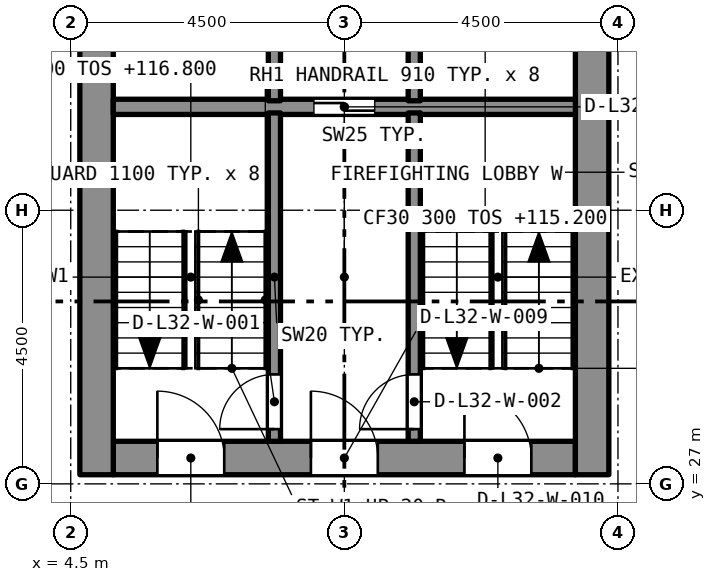
"""IFC4 building model, lengths in metres.
Left out: names, types, materials, properties, quantities, classifications, styles, units other than length and angle.
Written with IfcOpenShell. Run it as: python <this file> out.ifc"""

import sys

from ifc_helpers import new_model, si_unit, direction, frame, frame_2d, origin, place, context, subcontext, project, spatial, rectangle, extrude, element, fill, save


model = new_model("IFC4")
c1 = context("Model", 3, precision=1e-05, world=origin(), true_north=direction((0.0, 1.0)))
c2 = subcontext(c1, "Body", "Model", "MODEL_VIEW")
j1 = project(units=[si_unit("LENGTHUNIT", "METRE"), si_unit("PLANEANGLEUNIT", "RADIAN")], contexts=[c1])
p1 = place(None, origin())
s1 = spatial("IfcSite", under=j1, at=p1, CompositionType="ELEMENT")
p2 = place(p1, origin())
s2 = spatial("IfcBuilding", under=s1, at=p2, CompositionType="ELEMENT")
p3 = place(p2, frame((0.0, 0.0, 115.2)))
s3 = spatial("IfcBuildingStorey", under=s2, at=p3, CompositionType="ELEMENT", Elevation=115.2)
p4 = place(p3, frame((5.2, 27.425, 0.0), z_axis=(0.0, 0.0, 1.0), x_axis=(1.0, 0.0, 0.0)))
e1 = element("IfcWall", 1, at=p4, inside=s3, PredefinedType="SOLIDWALL", context=c2, shape_type="SweptSolid", body=[
    extrude(rectangle(XDim=7.6, YDim=0.55, at=frame_2d((3.8, 0.0))), origin(), (0.0, 0.0, 1.0), 3.2),
])
p5 = place(p4, frame((0.725, 0.0, 0.0)))
e2 = element("IfcOpeningElement", 2, at=p5, cuts=e1, PredefinedType="OPENING", context=c2, shape_type="SweptSolid", body=[
    extrude(rectangle(XDim=1.1, YDim=2.1, at=frame_2d((0.55, 1.05))), frame((0.0, 0.285, 0.0), z_axis=(0.0, -1.0, 0.0), x_axis=(1.0, 0.0, 0.0)), (0.0, 0.0, 1.0), 0.57),
])
p6 = place(p4, frame((3.25, 0.0, 0.0)))
e3 = element("IfcOpeningElement", 3, at=p6, cuts=e1, PredefinedType="OPENING", context=c2, shape_type="SweptSolid", body=[
    extrude(rectangle(XDim=1.1, YDim=2.1, at=frame_2d((0.55, 1.05))), frame((0.0, 0.285, 0.0), z_axis=(0.0, -1.0, 0.0), x_axis=(1.0, 0.0, 0.0)), (0.0, 0.0, 1.0), 0.57),
])
p7 = place(p4, frame((5.775, 0.0, 0.0)))
e4 = element("IfcOpeningElement", 4, at=p7, cuts=e1, PredefinedType="OPENING", context=c2, shape_type="SweptSolid", body=[
    extrude(rectangle(XDim=1.1, YDim=2.1, at=frame_2d((0.55, 1.05))), frame((0.0, 0.285, 0.0), z_axis=(0.0, -1.0, 0.0), x_axis=(1.0, 0.0, 0.0)), (0.0, 0.0, 1.0), 0.57),
])
p8 = place(p3, frame((4.925, 27.15, 0.0), z_axis=(0.0, 0.0, 1.0), x_axis=(0.0, 1.0, 0.0)))
e5 = element("IfcWall", 5, at=p8, inside=s3, PredefinedType="SOLIDWALL", context=c2, shape_type="SweptSolid", body=[
    extrude(rectangle(XDim=13.2, YDim=0.55, at=frame_2d((6.6, 0.0))), origin(), (0.0, 0.0, 1.0), 3.2),
])
p9 = place(p8, frame((8.8, 0.0, 0.0)))
e6 = element("IfcOpeningElement", 6, at=p9, cuts=e5, PredefinedType="OPENING", context=c2, shape_type="SweptSolid", body=[
    extrude(rectangle(XDim=1.2, YDim=2.1, at=frame_2d((0.6, 1.05))), frame((0.0, 0.285, 0.0), z_axis=(0.0, -1.0, 0.0), x_axis=(1.0, 0.0, 0.0)), (0.0, 0.0, 1.0), 0.57),
])
p10 = place(p3, frame((13.075, 27.15, 0.0), z_axis=(0.0, 0.0, 1.0), x_axis=(0.0, 1.0, 0.0)))
e7 = element("IfcWall", 7, at=p10, inside=s3, PredefinedType="SOLIDWALL", context=c2, shape_type="SweptSolid", body=[
    extrude(rectangle(XDim=13.2, YDim=0.55, at=frame_2d((6.6, 0.0))), origin(), (0.0, 0.0, 1.0), 3.2),
])
p11 = place(p10, frame((10.95, 0.0, 0.0)))
e8 = element("IfcOpeningElement", 8, at=p11, cuts=e7, PredefinedType="OPENING", context=c2, shape_type="SweptSolid", body=[
    extrude(rectangle(XDim=1.1, YDim=2.1, at=frame_2d((0.55, 1.05))), frame((0.0, 0.285, 0.0), z_axis=(0.0, -1.0, 0.0), x_axis=(1.0, 0.0, 0.0)), (0.0, 0.0, 1.0), 0.57),
])
p12 = place(p10, frame((8.8, 0.0, 0.0)))
e9 = element("IfcOpeningElement", 9, at=p12, cuts=e7, PredefinedType="OPENING", context=c2, shape_type="SweptSolid", body=[
    extrude(rectangle(XDim=1.2, YDim=2.1, at=frame_2d((0.6, 1.05))), frame((0.0, 0.285, 0.0), z_axis=(0.0, -1.0, 0.0), x_axis=(1.0, 0.0, 0.0)), (0.0, 0.0, 1.0), 0.57),
])
p13 = place(p3, frame((5.2, 33.2, 0.0), z_axis=(0.0, 0.0, 1.0), x_axis=(1.0, 0.0, 0.0)))
e10 = element("IfcWall", 10, at=p13, inside=s3, PredefinedType="SOLIDWALL", context=c2, shape_type="SweptSolid", body=[
    extrude(rectangle(XDim=7.6, YDim=0.25, at=frame_2d((3.8, 0.0))), origin(), (0.0, 0.0, 1.0), 2.9),
])
p14 = place(p13, frame((3.3, 0.0, 0.0)))
e11 = element("IfcOpeningElement", 11, at=p14, cuts=e10, PredefinedType="OPENING", context=c2, shape_type="SweptSolid", body=[
    extrude(rectangle(XDim=1.0, YDim=2.1, at=frame_2d((0.5, 1.05))), frame((0.0, 0.135, 0.0), z_axis=(0.0, -1.0, 0.0), x_axis=(1.0, 0.0, 0.0)), (0.0, 0.0, 1.0), 0.27),
])
p15 = place(p3, frame((7.85, 27.7, 0.0), z_axis=(0.0, 0.0, 1.0), x_axis=(0.0, 1.0, 0.0)))
e12 = element("IfcWall", 12, at=p15, inside=s3, PredefinedType="SOLIDWALL", context=c2, shape_type="SweptSolid", body=[
    extrude(rectangle(XDim=5.4, YDim=0.2, at=frame_2d((2.7, 0.0))), origin(), (0.0, 0.0, 1.0), 2.9),
])
p16 = place(p15, frame((0.2, 0.0, 0.0)))
e13 = element("IfcOpeningElement", 13, at=p16, cuts=e12, PredefinedType="OPENING", context=c2, shape_type="SweptSolid", body=[
    extrude(rectangle(XDim=0.9, YDim=2.1, at=frame_2d((0.45, 1.05))), frame((0.0, 0.11, 0.0), z_axis=(0.0, -1.0, 0.0), x_axis=(1.0, 0.0, 0.0)), (0.0, 0.0, 1.0), 0.22),
])
p17 = place(p3, frame((10.15, 27.7, 0.0), z_axis=(0.0, 0.0, 1.0), x_axis=(0.0, 1.0, 0.0)))
e14 = element("IfcWall", 14, at=p17, inside=s3, PredefinedType="SOLIDWALL", context=c2, shape_type="SweptSolid", body=[
    extrude(rectangle(XDim=5.4, YDim=0.2, at=frame_2d((2.7, 0.0))), origin(), (0.0, 0.0, 1.0), 2.9),
])
p18 = place(p17, frame((0.2, 0.0, 0.0)))
e15 = element("IfcOpeningElement", 15, at=p18, cuts=e14, PredefinedType="OPENING", context=c2, shape_type="SweptSolid", body=[
    extrude(rectangle(XDim=0.9, YDim=2.1, at=frame_2d((0.45, 1.05))), frame((0.0, 0.11, 0.0), z_axis=(0.0, -1.0, 0.0), x_axis=(1.0, 0.0, 0.0)), (0.0, 0.0, 1.0), 0.22),
])
for number, where, z_axis, x_axis in (
    (16, (7.85, 33.3, 0.0), (0.0, 0.0, 1.0), (0.0, 1.0, 0.0)),
    (17, (10.15, 33.3, 0.0), (0.0, 0.0, 1.0), (0.0, 1.0, 0.0)),
):
    element("IfcWall", number, at=place(p3, frame(where, z_axis=z_axis, x_axis=x_axis)), inside=s3, PredefinedType="SOLIDWALL", context=c2, shape_type="SweptSolid", body=[
        extrude(rectangle(XDim=2.3, YDim=0.2, at=frame_2d((1.15, 0.0))), origin(), (0.0, 0.0, 1.0), 2.9),
    ])
p19 = place(p16, origin())
e18 = element("IfcDoor", 18, at=p19, inside=s3, OperationType="SINGLE_SWING_LEFT", PredefinedType="DOOR", context=c2, shape_type="SweptSolid", body=[
    extrude(rectangle(XDim=0.9, YDim=2.1, at=frame_2d((0.45, 1.05))), frame((0.0, 0.025, 0.0), z_axis=(0.0, -1.0, 0.0), x_axis=(1.0, 0.0, 0.0)), (0.0, 0.0, 1.0), 0.05),
])
fill(e13, e18)
p20 = place(p18, origin())
e19 = element("IfcDoor", 19, at=p20, inside=s3, OperationType="SINGLE_SWING_LEFT", PredefinedType="DOOR", context=c2, shape_type="SweptSolid", body=[
    extrude(rectangle(XDim=0.9, YDim=2.1, at=frame_2d((0.45, 1.05))), frame((0.0, 0.025, 0.0), z_axis=(0.0, -1.0, 0.0), x_axis=(1.0, 0.0, 0.0)), (0.0, 0.0, 1.0), 0.05),
])
fill(e15, e19)
p21 = place(p14, origin())
e20 = element("IfcDoor", 20, at=p21, inside=s3, OperationType="SLIDING_TO_LEFT", PredefinedType="DOOR", context=c2, shape_type="SweptSolid", body=[
    extrude(rectangle(XDim=1.0, YDim=2.1, at=frame_2d((0.5, 1.05))), frame((0.0, 0.025, 0.0), z_axis=(0.0, -1.0, 0.0), x_axis=(1.0, 0.0, 0.0)), (0.0, 0.0, 1.0), 0.05),
])
fill(e11, e20)
p22 = place(p5, origin())
e21 = element("IfcDoor", 21, at=p22, inside=s3, OperationType="SINGLE_SWING_LEFT", PredefinedType="DOOR", context=c2, shape_type="SweptSolid", body=[
    extrude(rectangle(XDim=1.1, YDim=2.1, at=frame_2d((0.55, 1.05))), frame((0.0, 0.025, 0.0), z_axis=(0.0, -1.0, 0.0), x_axis=(1.0, 0.0, 0.0)), (0.0, 0.0, 1.0), 0.05),
])
fill(e2, e21)
p23 = place(p6, origin())
e22 = element("IfcDoor", 22, at=p23, inside=s3, OperationType="SINGLE_SWING_LEFT", PredefinedType="DOOR", context=c2, shape_type="SweptSolid", body=[
    extrude(rectangle(XDim=1.1, YDim=2.1, at=frame_2d((0.55, 1.05))), frame((0.0, 0.025, 0.0), z_axis=(0.0, -1.0, 0.0), x_axis=(1.0, 0.0, 0.0)), (0.0, 0.0, 1.0), 0.05),
])
fill(e3, e22)
p24 = place(p7, origin())
e23 = element("IfcDoor", 23, at=p24, inside=s3, OperationType="SINGLE_SWING_LEFT", PredefinedType="DOOR", context=c2, shape_type="SweptSolid", body=[
    extrude(rectangle(XDim=1.1, YDim=2.1, at=frame_2d((0.55, 1.05))), frame((0.0, 0.025, 0.0), z_axis=(0.0, -1.0, 0.0), x_axis=(1.0, 0.0, 0.0)), (0.0, 0.0, 1.0), 0.05),
])
fill(e4, e23)
save(model, sys.argv[1])
